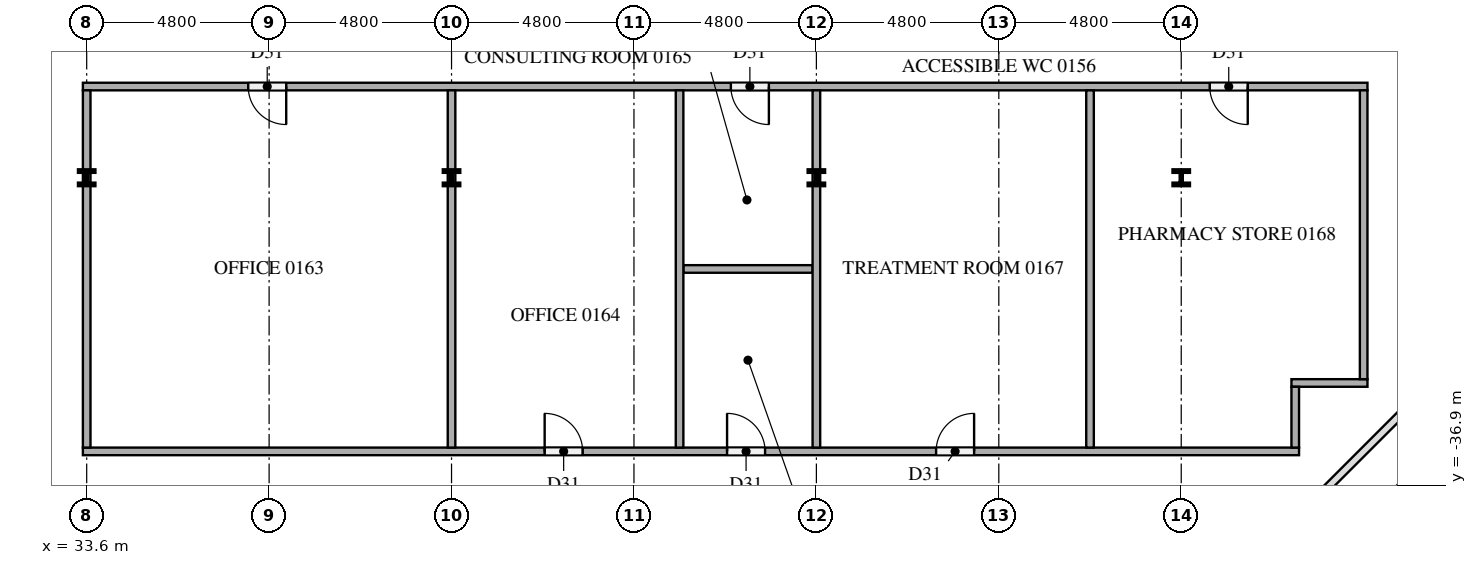
"""IFC4 building model, lengths in metres.
Left out: names, types, materials, properties, quantities, classifications, styles, units other than length and angle.
Written with IfcOpenShell. Run it as: python <this file> out.ifc"""

import sys

from ifc_helpers import new_model, si_unit, direction, frame, frame_2d, origin, origin_2d, place, context, subcontext, project, spatial, rectangle, i_section, extrude, element, fill, save


model = new_model("IFC4")
c1 = context("Model", 3, precision=1e-05, world=origin(), true_north=direction((0.0, 1.0)))
c2 = subcontext(c1, "Body", "Model", "MODEL_VIEW")
j1 = project(units=[si_unit("LENGTHUNIT", "METRE"), si_unit("PLANEANGLEUNIT", "RADIAN")], contexts=[c1])
p1 = place(None, origin())
s1 = spatial("IfcSite", under=j1, at=p1, CompositionType="ELEMENT")
p2 = place(p1, origin())
s2 = spatial("IfcBuilding", under=s1, at=p2, CompositionType="ELEMENT")
p3 = place(p2, frame((0.0, 0.0, 6.0)))
s3 = spatial("IfcBuildingStorey", under=s2, at=p3, CompositionType="ELEMENT", Elevation=6.0)
for number, where, z_axis, x_axis in (
    (1, (33.6, -28.8, 0.0), (0.0, 0.0, 1.0), (1.0, 0.0, 0.0)),
    (2, (43.2, -28.8, 0.0), (0.0, 0.0, 1.0), (1.0, 0.0, 0.0)),
    (3, (52.8, -28.8, 0.0), (0.0, 0.0, 1.0), (1.0, 0.0, 0.0)),
    (4, (62.4, -28.8, 0.0), (0.0, 0.0, 1.0), (1.0, 0.0, 0.0)),
):
    element("IfcColumn", number, at=place(p3, frame(where, z_axis=z_axis, x_axis=x_axis)), inside=s3, PredefinedType="COLUMN", context=c2, shape_type="SweptSolid", body=[
        extrude(i_section(OverallWidth=0.396, OverallDepth=0.381, WebThickness=0.019, FlangeThickness=0.03, at=origin_2d()), origin(), (0.0, 0.0, 1.0), 4.2),
    ])
p4 = place(p3, frame((33.5, -36.0, 0.0), z_axis=(0.0, 0.0, 1.0), x_axis=(1.0, 0.0, 0.0)))
e5 = element("IfcWall", 5, at=p4, inside=s3, PredefinedType="PARTITIONING", context=c2, shape_type="SweptSolid", body=[
    extrude(rectangle(XDim=32.0, YDim=0.2, at=frame_2d((16.0, 0.0))), origin(), (0.0, 0.0, 1.0), 4.2),
])
p5 = place(p4, frame((12.15, 0.0, 0.0)))
e6 = element("IfcOpeningElement", 6, at=p5, cuts=e5, PredefinedType="OPENING", context=c2, shape_type="SweptSolid", body=[
    extrude(rectangle(XDim=1.0, YDim=2.1, at=frame_2d((0.5, 1.05))), frame((0.0, 0.11, 0.0), z_axis=(0.0, -1.0, 0.0), x_axis=(1.0, 0.0, 0.0)), (0.0, 0.0, 1.0), 0.22),
])
p6 = place(p4, frame((16.95, 0.0, 0.0)))
e7 = element("IfcOpeningElement", 7, at=p6, cuts=e5, PredefinedType="OPENING", context=c2, shape_type="SweptSolid", body=[
    extrude(rectangle(XDim=1.0, YDim=2.1, at=frame_2d((0.5, 1.05))), frame((0.0, 0.11, 0.0), z_axis=(0.0, -1.0, 0.0), x_axis=(1.0, 0.0, 0.0)), (0.0, 0.0, 1.0), 0.22),
])
p7 = place(p4, frame((22.45, 0.0, 0.0)))
e8 = element("IfcOpeningElement", 8, at=p7, cuts=e5, PredefinedType="OPENING", context=c2, shape_type="SweptSolid", body=[
    extrude(rectangle(XDim=1.0, YDim=2.1, at=frame_2d((0.5, 1.05))), frame((0.0, 0.11, 0.0), z_axis=(0.0, -1.0, 0.0), x_axis=(1.0, 0.0, 0.0)), (0.0, 0.0, 1.0), 0.22),
])
p8 = place(p3, frame((65.3, -34.2, 0.0), z_axis=(0.0, 0.0, 1.0), x_axis=(1.0, 0.0, 0.0)))
e9 = element("IfcWall", 9, at=p8, inside=s3, PredefinedType="PARTITIONING", context=c2, shape_type="SweptSolid", body=[
    extrude(rectangle(XDim=2.0, YDim=0.2, at=frame_2d((1.0, 0.0))), origin(), (0.0, 0.0, 1.0), 4.2),
])
p9 = place(p3, frame((49.3, -31.2, 0.0), z_axis=(0.0, 0.0, 1.0), x_axis=(1.0, 0.0, 0.0)))
e10 = element("IfcWall", 10, at=p9, inside=s3, PredefinedType="PARTITIONING", context=c2, shape_type="SweptSolid", body=[
    extrude(rectangle(XDim=3.4, YDim=0.2, at=frame_2d((1.7, 0.0))), origin(), (0.0, 0.0, 1.0), 4.2),
])
p10 = place(p3, frame((67.3, -26.4, 0.0), z_axis=(0.0, 0.0, 1.0), x_axis=(-1.0, 0.0, 0.0)))
e11 = element("IfcWall", 11, at=p10, inside=s3, PredefinedType="PARTITIONING", context=c2, shape_type="SweptSolid", body=[
    extrude(rectangle(XDim=33.8, YDim=0.2, at=frame_2d((16.9, 0.0))), origin(), (0.0, 0.0, 1.0), 4.2),
])
p11 = place(p10, frame((28.45, 0.0, 0.0)))
e12 = element("IfcOpeningElement", 12, at=p11, cuts=e11, PredefinedType="OPENING", context=c2, shape_type="SweptSolid", body=[
    extrude(rectangle(XDim=1.0, YDim=2.1, at=frame_2d((0.5, 1.05))), frame((0.0, 0.11, 0.0), z_axis=(0.0, -1.0, 0.0), x_axis=(1.0, 0.0, 0.0)), (0.0, 0.0, 1.0), 0.22),
])
p12 = place(p10, frame((15.75, 0.0, 0.0)))
e13 = element("IfcOpeningElement", 13, at=p12, cuts=e11, PredefinedType="OPENING", context=c2, shape_type="SweptSolid", body=[
    extrude(rectangle(XDim=1.0, YDim=2.1, at=frame_2d((0.5, 1.05))), frame((0.0, 0.11, 0.0), z_axis=(0.0, -1.0, 0.0), x_axis=(1.0, 0.0, 0.0)), (0.0, 0.0, 1.0), 0.22),
])
p13 = place(p10, frame((3.15, 0.0, 0.0)))
e14 = element("IfcOpeningElement", 14, at=p13, cuts=e11, PredefinedType="OPENING", context=c2, shape_type="SweptSolid", body=[
    extrude(rectangle(XDim=1.0, YDim=2.1, at=frame_2d((0.5, 1.05))), frame((0.0, 0.11, 0.0), z_axis=(0.0, -1.0, 0.0), x_axis=(1.0, 0.0, 0.0)), (0.0, 0.0, 1.0), 0.22),
])
for number, where, z_axis, x_axis in (
    (15, (33.6, -35.9, 0.0), (0.0, 0.0, 1.0), (0.0, 1.0, 0.0)),
    (16, (43.2, -35.9, 0.0), (0.0, 0.0, 1.0), (0.0, 1.0, 0.0)),
    (17, (49.2, -35.9, 0.0), (0.0, 0.0, 1.0), (0.0, 1.0, 0.0)),
    (18, (52.8, -35.9, 0.0), (0.0, 0.0, 1.0), (0.0, 1.0, 0.0)),
    (19, (60.0, -35.9, 0.0), (0.0, 0.0, 1.0), (0.0, 1.0, 0.0)),
):
    element("IfcWall", number, at=place(p3, frame(where, z_axis=z_axis, x_axis=x_axis)), inside=s3, PredefinedType="PARTITIONING", context=c2, shape_type="SweptSolid", body=[
        extrude(rectangle(XDim=9.4, YDim=0.2, at=frame_2d((4.7, 0.0))), origin(), (0.0, 0.0, 1.0), 4.2),
    ])
p14 = place(p3, frame((65.4, -35.9, 0.0), z_axis=(0.0, 0.0, 1.0), x_axis=(0.0, 1.0, 0.0)))
e20 = element("IfcWall", 20, at=p14, inside=s3, PredefinedType="PARTITIONING", context=c2, shape_type="SweptSolid", body=[
    extrude(rectangle(XDim=1.6, YDim=0.2, at=frame_2d((0.8, 0.0))), origin(), (0.0, 0.0, 1.0), 4.2),
])
p15 = place(p3, frame((67.2, -34.1, 0.0), z_axis=(0.0, 0.0, 1.0), x_axis=(0.0, 1.0, 0.0)))
e21 = element("IfcWall", 21, at=p15, inside=s3, PredefinedType="PARTITIONING", context=c2, shape_type="SweptSolid", body=[
    extrude(rectangle(XDim=7.6, YDim=0.2, at=frame_2d((3.8, 0.0))), origin(), (0.0, 0.0, 1.0), 4.2),
])
p16 = place(p11, origin())
e22 = element("IfcDoor", 22, at=p16, inside=s3, OperationType="SINGLE_SWING_LEFT", PredefinedType="DOOR", context=c2, shape_type="SweptSolid", body=[
    extrude(rectangle(XDim=1.0, YDim=2.1, at=frame_2d((0.5, 1.05))), frame((0.0, 0.025, 0.0), z_axis=(0.0, -1.0, 0.0), x_axis=(1.0, 0.0, 0.0)), (0.0, 0.0, 1.0), 0.05),
])
fill(e12, e22)
p17 = place(p5, origin())
e23 = element("IfcDoor", 23, at=p17, inside=s3, OperationType="SINGLE_SWING_LEFT", PredefinedType="DOOR", context=c2, shape_type="SweptSolid", body=[
    extrude(rectangle(XDim=1.0, YDim=2.1, at=frame_2d((0.5, 1.05))), frame((0.0, 0.025, 0.0), z_axis=(0.0, -1.0, 0.0), x_axis=(1.0, 0.0, 0.0)), (0.0, 0.0, 1.0), 0.05),
])
fill(e6, e23)
p18 = place(p12, origin())
e24 = element("IfcDoor", 24, at=p18, inside=s3, OperationType="SINGLE_SWING_LEFT", PredefinedType="DOOR", context=c2, shape_type="SweptSolid", body=[
    extrude(rectangle(XDim=1.0, YDim=2.1, at=frame_2d((0.5, 1.05))), frame((0.0, 0.025, 0.0), z_axis=(0.0, -1.0, 0.0), x_axis=(1.0, 0.0, 0.0)), (0.0, 0.0, 1.0), 0.05),
])
fill(e13, e24)
p19 = place(p6, origin())
e25 = element("IfcDoor", 25, at=p19, inside=s3, OperationType="SINGLE_SWING_LEFT", PredefinedType="DOOR", context=c2, shape_type="SweptSolid", body=[
    extrude(rectangle(XDim=1.0, YDim=2.1, at=frame_2d((0.5, 1.05))), frame((0.0, 0.025, 0.0), z_axis=(0.0, -1.0, 0.0), x_axis=(1.0, 0.0, 0.0)), (0.0, 0.0, 1.0), 0.05),
])
fill(e7, e25)
p20 = place(p7, origin())
e26 = element("IfcDoor", 26, at=p20, inside=s3, OperationType="SINGLE_SWING_RIGHT", PredefinedType="DOOR", context=c2, shape_type="SweptSolid", body=[
    extrude(rectangle(XDim=1.0, YDim=2.1, at=frame_2d((0.5, 1.05))), frame((0.0, 0.025, 0.0), z_axis=(0.0, -1.0, 0.0), x_axis=(1.0, 0.0, 0.0)), (0.0, 0.0, 1.0), 0.05),
])
fill(e8, e26)
p21 = place(p13, origin())
e27 = element("IfcDoor", 27, at=p21, inside=s3, OperationType="SINGLE_SWING_LEFT", PredefinedType="DOOR", context=c2, shape_type="SweptSolid", body=[
    extrude(rectangle(XDim=1.0, YDim=2.1, at=frame_2d((0.5, 1.05))), frame((0.0, 0.025, 0.0), z_axis=(0.0, -1.0, 0.0), x_axis=(1.0, 0.0, 0.0)), (0.0, 0.0, 1.0), 0.05),
])
fill(e14, e27)
save(model, sys.argv[1])
